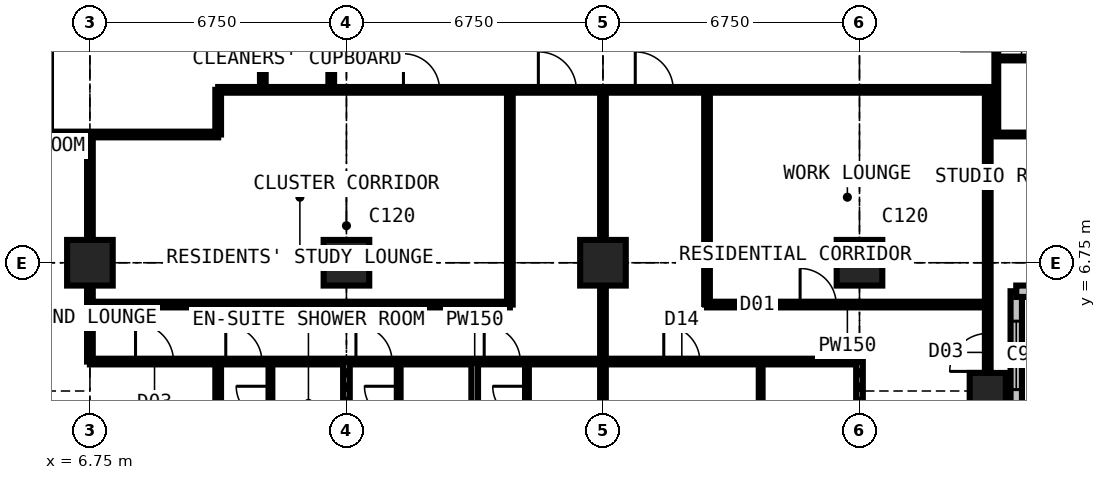
"""IFC4 building model, lengths in metres.
Left out: names, types, materials, properties, quantities, classifications, styles, units other than length and angle.
Written with IfcOpenShell. Run it as: python <this file> out.ifc"""

import sys

from ifc_helpers import new_model, si_unit, direction, frame, frame_2d, origin, origin_2d, place, context, subcontext, project, spatial, rectangle, extrude, element, fill, save


model = new_model("IFC4")
c1 = context("Model", 3, precision=1e-05, world=origin(), true_north=direction((0.0, 1.0)))
c2 = subcontext(c1, "Body", "Model", "MODEL_VIEW")
j1 = project(units=[si_unit("LENGTHUNIT", "METRE"), si_unit("PLANEANGLEUNIT", "RADIAN")], contexts=[c1])
p1 = place(None, origin())
s1 = spatial("IfcSite", under=j1, at=p1, CompositionType="ELEMENT")
p2 = place(p1, origin())
s2 = spatial("IfcBuilding", under=s1, at=p2, CompositionType="ELEMENT")
p3 = place(p2, frame((0.0, 0.0, 174.6)))
s3 = spatial("IfcBuildingStorey", under=s2, at=p3, CompositionType="ELEMENT", Elevation=174.6)
for number, where, z_axis, x_axis in (
    (1, (6.75, 6.75, 0.0), (0.0, 0.0, 1.0), (1.0, 0.0, 0.0)),
    (2, (13.5, 6.75, 0.0), (0.0, 0.0, 1.0), (1.0, 0.0, 0.0)),
    (3, (20.25, 6.75, 0.0), (0.0, 0.0, 1.0), (1.0, 0.0, 0.0)),
    (4, (27.0, 6.75, 0.0), (0.0, 0.0, 1.0), (1.0, 0.0, 0.0)),
):
    element("IfcColumn", number, at=place(p3, frame(where, z_axis=z_axis, x_axis=x_axis)), inside=s3, PredefinedType="COLUMN", context=c2, shape_type="SweptSolid", body=[
        extrude(rectangle(XDim=1.2, YDim=1.2, at=origin_2d()), origin(), (0.0, 0.0, 1.0), 3.6),
    ])
p4 = place(p3, frame((30.375, 3.375, 0.0), z_axis=(0.0, 0.0, 1.0), x_axis=(1.0, 0.0, 0.0)))
e5 = element("IfcColumn", 5, at=p4, inside=s3, PredefinedType="COLUMN", context=c2, shape_type="SweptSolid", body=[
    extrude(rectangle(XDim=0.95, YDim=0.95, at=origin_2d()), origin(), (0.0, 0.0, 1.0), 3.6),
])
p5 = place(p3, frame((31.125, 2.625, 0.0), z_axis=(0.0, 0.0, 1.0), x_axis=(0.0, 1.0, 0.0)))
e6 = element("IfcWall", 6, at=p5, inside=s3, PredefinedType="SOLIDWALL", context=c2, shape_type="SweptSolid", body=[
    extrude(rectangle(XDim=3.375, YDim=0.3, at=frame_2d((1.688, 0.0))), origin(), (0.0, 0.0, 1.0), 3.375),
])
p6 = place(p5, frame((0.788, 0.0, 0.6)))
e7 = element("IfcOpeningElement", 7, at=p6, cuts=e6, PredefinedType="OPENING", context=c2, shape_type="SweptSolid", body=[
    extrude(rectangle(XDim=1.8, YDim=2.1, at=frame_2d((0.9, 1.05))), frame((0.0, 0.16, 0.0), z_axis=(0.0, -1.0, 0.0), x_axis=(1.0, 0.0, 0.0)), (0.0, 0.0, 1.0), 0.32),
])
p7 = place(p3, frame((31.125, 6.0, 0.0), z_axis=(0.0, 0.0, 1.0), x_axis=(1.0, 0.0, 0.0)))
e8 = element("IfcWall", 8, at=p7, inside=s3, PredefinedType="SOLIDWALL", context=c2, shape_type="SweptSolid", body=[
    extrude(rectangle(XDim=3.375, YDim=0.3, at=frame_2d((1.688, 0.0))), origin(), (0.0, 0.0, 1.0), 3.375),
])
p8 = place(p7, frame((0.788, 0.0, 0.6)))
e9 = element("IfcOpeningElement", 9, at=p8, cuts=e8, PredefinedType="OPENING", context=c2, shape_type="SweptSolid", body=[
    extrude(rectangle(XDim=1.8, YDim=2.1, at=frame_2d((0.9, 1.05))), frame((0.0, 0.16, 0.0), z_axis=(0.0, -1.0, 0.0), x_axis=(1.0, 0.0, 0.0)), (0.0, 0.0, 1.0), 0.32),
])
p9 = place(p3, frame((-0.734, 10.125, 0.0), z_axis=(0.0, 0.0, 1.0), x_axis=(1.0, 0.0, 0.0)))
e10 = element("IfcWall", 10, at=p9, inside=s3, PredefinedType="PARTITIONING", context=c2, shape_type="SweptSolid", body=[
    extrude(rectangle(XDim=10.859, YDim=0.15, at=frame_2d((5.429, 0.0))), origin(), (0.0, 0.0, 1.0), 3.375),
])
p10 = place(p3, frame((6.75, 4.15, 0.0), z_axis=(0.0, 0.0, 1.0), x_axis=(0.0, 1.0, 0.0)))
e11 = element("IfcWall", 11, at=p10, inside=s3, PredefinedType="PARTITIONING", context=c2, shape_type="SweptSolid", body=[
    extrude(rectangle(XDim=5.975, YDim=0.15, at=frame_2d((2.988, 0.0))), origin(), (0.0, 0.0, 1.0), 2.877),
])
p11 = place(p3, frame((6.75, 4.15, 0.0), z_axis=(0.0, 0.0, 1.0), x_axis=(1.0, 0.0, 0.0)))
e12 = element("IfcWall", 12, at=p11, inside=s3, PredefinedType="PARTITIONING", context=c2, shape_type="SweptSolid", body=[
    extrude(rectangle(XDim=20.25, YDim=0.15, at=frame_2d((10.125, 0.0))), origin(), (0.0, 0.0, 1.0), 3.375),
])
p12 = place(p11, frame((1.2, 0.0, 0.0)))
e13 = element("IfcOpeningElement", 13, at=p12, cuts=e12, PredefinedType="OPENING", context=c2, shape_type="SweptSolid", body=[
    extrude(rectangle(XDim=1.0, YDim=2.2, at=frame_2d((0.5, 1.1))), frame((0.0, 0.085, 0.0), z_axis=(0.0, -1.0, 0.0), x_axis=(1.0, 0.0, 0.0)), (0.0, 0.0, 1.0), 0.17),
])
p13 = place(p11, frame((3.575, 0.0, 0.0)))
e14 = element("IfcOpeningElement", 14, at=p13, cuts=e12, PredefinedType="OPENING", context=c2, shape_type="SweptSolid", body=[
    extrude(rectangle(XDim=0.95, YDim=2.2, at=frame_2d((0.475, 1.1))), frame((0.0, 0.085, 0.0), z_axis=(0.0, -1.0, 0.0), x_axis=(1.0, 0.0, 0.0)), (0.0, 0.0, 1.0), 0.17),
])
p14 = place(p11, frame((7.0, 0.0, 0.0)))
e15 = element("IfcOpeningElement", 15, at=p14, cuts=e12, PredefinedType="OPENING", context=c2, shape_type="SweptSolid", body=[
    extrude(rectangle(XDim=0.95, YDim=2.2, at=frame_2d((0.475, 1.1))), frame((0.0, 0.085, 0.0), z_axis=(0.0, -1.0, 0.0), x_axis=(1.0, 0.0, 0.0)), (0.0, 0.0, 1.0), 0.17),
])
p15 = place(p11, frame((10.375, 0.0, 0.0)))
e16 = element("IfcOpeningElement", 16, at=p15, cuts=e12, PredefinedType="OPENING", context=c2, shape_type="SweptSolid", body=[
    extrude(rectangle(XDim=0.95, YDim=2.2, at=frame_2d((0.475, 1.1))), frame((0.0, 0.085, 0.0), z_axis=(0.0, -1.0, 0.0), x_axis=(1.0, 0.0, 0.0)), (0.0, 0.0, 1.0), 0.17),
])
p16 = place(p11, frame((15.1, 0.0, 0.0)))
e17 = element("IfcOpeningElement", 17, at=p16, cuts=e12, PredefinedType="OPENING", context=c2, shape_type="SweptSolid", body=[
    extrude(rectangle(XDim=0.95, YDim=2.2, at=frame_2d((0.475, 1.1))), frame((0.0, 0.085, 0.0), z_axis=(0.0, -1.0, 0.0), x_axis=(1.0, 0.0, 0.0)), (0.0, 0.0, 1.0), 0.17),
])
p17 = place(p3, frame((6.75, 5.65, 0.0), z_axis=(0.0, 0.0, 1.0), x_axis=(1.0, 0.0, 0.0)))
e18 = element("IfcWall", 18, at=p17, inside=s3, PredefinedType="PARTITIONING", context=c2, shape_type="SweptSolid", body=[
    extrude(rectangle(XDim=11.05, YDim=0.15, at=frame_2d((5.525, 0.0))), origin(), (0.0, 0.0, 1.0), 3.375),
])
p18 = place(p3, frame((10.125, -0.734, 0.0), z_axis=(0.0, 0.0, 1.0), x_axis=(0.0, 1.0, 0.0)))
e19 = element("IfcWall", 19, at=p18, inside=s3, PredefinedType="PARTITIONING", context=c2, shape_type="SweptSolid", body=[
    extrude(rectangle(XDim=4.884, YDim=0.15, at=frame_2d((2.442, 0.0))), origin(), (0.0, 0.0, 1.0), 3.375),
])
p19 = place(p3, frame((10.125, 10.125, 0.0), z_axis=(0.0, 0.0, 1.0), x_axis=(0.0, 1.0, 0.0)))
e20 = element("IfcWall", 20, at=p19, inside=s3, PredefinedType="PARTITIONING", context=c2, shape_type="SweptSolid", body=[
    extrude(rectangle(XDim=1.175, YDim=0.15, at=frame_2d((0.587, 0.0))), origin(), (0.0, 0.0, 1.0), 3.375),
])
p20 = place(p3, frame((10.125, 11.3, 0.0), z_axis=(0.0, 0.0, 1.0), x_axis=(1.0, 0.0, 0.0)))
e21 = element("IfcWall", 21, at=p20, inside=s3, PredefinedType="PARTITIONING", context=c2, shape_type="SweptSolid", body=[
    extrude(rectangle(XDim=20.475, YDim=0.15, at=frame_2d((10.238, 0.0))), origin(), (0.0, 0.0, 1.0), 3.375),
])
p21 = place(p20, frame((8.425, 0.0, 0.0)))
e22 = element("IfcOpeningElement", 22, at=p21, cuts=e21, PredefinedType="OPENING", context=c2, shape_type="SweptSolid", body=[
    extrude(rectangle(XDim=1.0, YDim=2.2, at=frame_2d((0.5, 1.1))), frame((0.0, 0.085, 0.0), z_axis=(0.0, -1.0, 0.0), x_axis=(1.0, 0.0, 0.0)), (0.0, 0.0, 1.0), 0.17),
])
p22 = place(p20, frame((10.975, 0.0, 0.0)))
e23 = element("IfcOpeningElement", 23, at=p22, cuts=e21, PredefinedType="OPENING", context=c2, shape_type="SweptSolid", body=[
    extrude(rectangle(XDim=1.0, YDim=2.2, at=frame_2d((0.5, 1.1))), frame((0.0, 0.085, 0.0), z_axis=(0.0, -1.0, 0.0), x_axis=(1.0, 0.0, 0.0)), (0.0, 0.0, 1.0), 0.17),
])
p23 = place(p20, frame((4.875, 0.0, 0.0)))
e24 = element("IfcOpeningElement", 24, at=p23, cuts=e21, PredefinedType="OPENING", context=c2, shape_type="SweptSolid", body=[
    extrude(rectangle(XDim=0.95, YDim=2.2, at=frame_2d((0.475, 1.1))), frame((0.0, 0.085, 0.0), z_axis=(0.0, -1.0, 0.0), x_axis=(1.0, 0.0, 0.0)), (0.0, 0.0, 1.0), 0.17),
])
p24 = place(p3, frame((11.3, 11.3, 0.0), z_axis=(0.0, 0.0, 1.0), x_axis=(0.0, 1.0, 0.0)))
e25 = element("IfcWall", 25, at=p24, inside=s3, PredefinedType="PARTITIONING", context=c2, shape_type="SweptSolid", body=[
    extrude(rectangle(XDim=19.3, YDim=0.15, at=frame_2d((9.65, 0.0))), origin(), (0.0, 0.0, 1.0), 3.375),
])
p25 = place(p24, frame((18.1, 0.0, 0.0)))
e26 = element("IfcOpeningElement", 26, at=p25, cuts=e25, PredefinedType="OPENING", context=c2, shape_type="SweptSolid", body=[
    extrude(rectangle(XDim=1.0, YDim=2.2, at=frame_2d((0.5, 1.1))), frame((0.0, 0.085, 0.0), z_axis=(0.0, -1.0, 0.0), x_axis=(1.0, 0.0, 0.0)), (0.0, 0.0, 1.0), 0.17),
])
p26 = place(p24, frame((10.137, 0.0, 0.0)))
e27 = element("IfcOpeningElement", 27, at=p26, cuts=e25, PredefinedType="OPENING", context=c2, shape_type="SweptSolid", body=[
    extrude(rectangle(XDim=1.0, YDim=2.2, at=frame_2d((0.5, 1.1))), frame((0.0, 0.085, 0.0), z_axis=(0.0, -1.0, 0.0), x_axis=(1.0, 0.0, 0.0)), (0.0, 0.0, 1.0), 0.17),
])
p27 = place(p3, frame((11.5, 1.95, 0.0), z_axis=(0.0, 0.0, 1.0), x_axis=(0.0, 1.0, 0.0)))
e28 = element("IfcWall", 28, at=p27, inside=s3, PredefinedType="PARTITIONING", context=c2, shape_type="SweptSolid", body=[
    extrude(rectangle(XDim=2.2, YDim=0.1, at=frame_2d((1.1, 0.0))), origin(), (0.0, 0.0, 1.0), 3.375),
])
p28 = place(p27, frame((0.65, 0.0, 0.0)))
e29 = element("IfcOpeningElement", 29, at=p28, cuts=e28, PredefinedType="OPENING", context=c2, shape_type="SweptSolid", body=[
    extrude(rectangle(XDim=0.9, YDim=2.2, at=frame_2d((0.45, 1.1))), frame((0.0, 0.06, 0.0), z_axis=(0.0, -1.0, 0.0), x_axis=(1.0, 0.0, 0.0)), (0.0, 0.0, 1.0), 0.12),
])
p29 = place(p3, frame((13.1, 11.3, 0.0), z_axis=(0.0, 0.0, 1.0), x_axis=(0.0, 1.0, 0.0)))
e30 = element("IfcWall", 30, at=p29, inside=s3, PredefinedType="PARTITIONING", context=c2, shape_type="SweptSolid", body=[
    extrude(rectangle(XDim=1.6, YDim=0.15, at=frame_2d((0.8, 0.0))), origin(), (0.0, 0.0, 1.0), 3.375),
])
p30 = place(p3, frame((13.5, -0.734, 0.0), z_axis=(0.0, 0.0, 1.0), x_axis=(0.0, 1.0, 0.0)))
e31 = element("IfcWall", 31, at=p30, inside=s3, PredefinedType="PARTITIONING", context=c2, shape_type="SweptSolid", body=[
    extrude(rectangle(XDim=4.884, YDim=0.175, at=frame_2d((2.442, 0.0))), origin(), (0.0, 0.0, 1.0), 2.61),
])
p31 = place(p3, frame((14.875, 1.95, 0.0), z_axis=(0.0, 0.0, 1.0), x_axis=(0.0, 1.0, 0.0)))
e32 = element("IfcWall", 32, at=p31, inside=s3, PredefinedType="PARTITIONING", context=c2, shape_type="SweptSolid", body=[
    extrude(rectangle(XDim=2.2, YDim=0.1, at=frame_2d((1.1, 0.0))), origin(), (0.0, 0.0, 1.0), 3.375),
])
p32 = place(p31, frame((0.65, 0.0, 0.0)))
e33 = element("IfcOpeningElement", 33, at=p32, cuts=e32, PredefinedType="OPENING", context=c2, shape_type="SweptSolid", body=[
    extrude(rectangle(XDim=0.9, YDim=2.2, at=frame_2d((0.45, 1.1))), frame((0.0, 0.06, 0.0), z_axis=(0.0, -1.0, 0.0), x_axis=(1.0, 0.0, 0.0)), (0.0, 0.0, 1.0), 0.12),
])
p33 = place(p3, frame((16.875, -0.734, 0.0), z_axis=(0.0, 0.0, 1.0), x_axis=(0.0, 1.0, 0.0)))
e34 = element("IfcWall", 34, at=p33, inside=s3, PredefinedType="PARTITIONING", context=c2, shape_type="SweptSolid", body=[
    extrude(rectangle(XDim=4.884, YDim=0.175, at=frame_2d((2.442, 0.0))), origin(), (0.0, 0.0, 1.0), 3.375),
])
p34 = place(p3, frame((17.8, 5.65, 0.0), z_axis=(0.0, 0.0, 1.0), x_axis=(0.0, 1.0, 0.0)))
e35 = element("IfcWall", 35, at=p34, inside=s3, PredefinedType="PARTITIONING", context=c2, shape_type="SweptSolid", body=[
    extrude(rectangle(XDim=5.65, YDim=0.15, at=frame_2d((2.825, 0.0))), origin(), (0.0, 0.0, 1.0), 3.375),
])
p35 = place(p3, frame((18.25, 1.95, 0.0), z_axis=(0.0, 0.0, 1.0), x_axis=(0.0, 1.0, 0.0)))
e36 = element("IfcWall", 36, at=p35, inside=s3, PredefinedType="PARTITIONING", context=c2, shape_type="SweptSolid", body=[
    extrude(rectangle(XDim=2.2, YDim=0.1, at=frame_2d((1.1, 0.0))), origin(), (0.0, 0.0, 1.0), 3.375),
])
p36 = place(p35, frame((0.65, 0.0, 0.0)))
e37 = element("IfcOpeningElement", 37, at=p36, cuts=e36, PredefinedType="OPENING", context=c2, shape_type="SweptSolid", body=[
    extrude(rectangle(XDim=0.9, YDim=2.2, at=frame_2d((0.45, 1.1))), frame((0.0, 0.06, 0.0), z_axis=(0.0, -1.0, 0.0), x_axis=(1.0, 0.0, 0.0)), (0.0, 0.0, 1.0), 0.12),
])
p37 = place(p3, frame((20.25, -0.734, 0.0), z_axis=(0.0, 0.0, 1.0), x_axis=(0.0, 1.0, 0.0)))
e38 = element("IfcWall", 38, at=p37, inside=s3, PredefinedType="PARTITIONING", context=c2, shape_type="SweptSolid", body=[
    extrude(rectangle(XDim=12.034, YDim=0.15, at=frame_2d((6.017, 0.0))), origin(), (0.0, 0.0, 1.0), 2.61),
])
p38 = place(p3, frame((22.988, 5.65, 0.0), z_axis=(0.0, 0.0, 1.0), x_axis=(1.0, 0.0, 0.0)))
e39 = element("IfcWall", 39, at=p38, inside=s3, PredefinedType="PARTITIONING", context=c2, shape_type="SweptSolid", body=[
    extrude(rectangle(XDim=7.387, YDim=0.15, at=frame_2d((3.694, 0.0))), origin(), (0.0, 0.0, 1.0), 3.375),
])
p39 = place(p38, frame((2.45, 0.0, 0.0)))
e40 = element("IfcOpeningElement", 40, at=p39, cuts=e39, PredefinedType="OPENING", context=c2, shape_type="SweptSolid", body=[
    extrude(rectangle(XDim=0.95, YDim=2.2, at=frame_2d((0.475, 1.1))), frame((0.0, 0.085, 0.0), z_axis=(0.0, -1.0, 0.0), x_axis=(1.0, 0.0, 0.0)), (0.0, 0.0, 1.0), 0.17),
])
p40 = place(p3, frame((22.988, 5.65, 0.0), z_axis=(0.0, 0.0, 1.0), x_axis=(0.0, 1.0, 0.0)))
e41 = element("IfcWall", 41, at=p40, inside=s3, PredefinedType="PARTITIONING", context=c2, shape_type="SweptSolid", body=[
    extrude(rectangle(XDim=5.65, YDim=0.15, at=frame_2d((2.825, 0.0))), origin(), (0.0, 0.0, 1.0), 3.375),
])
p41 = place(p3, frame((24.4, 1.75, 0.0), z_axis=(0.0, 0.0, 1.0), x_axis=(0.0, 1.0, 0.0)))
e42 = element("IfcWall", 42, at=p41, inside=s3, PredefinedType="PARTITIONING", context=c2, shape_type="SweptSolid", body=[
    extrude(rectangle(XDim=2.4, YDim=0.1, at=frame_2d((1.2, 0.0))), origin(), (0.0, 0.0, 1.0), 3.375),
])
p42 = place(p3, frame((27.0, -0.734, 0.0), z_axis=(0.0, 0.0, 1.0), x_axis=(0.0, 1.0, 0.0)))
e43 = element("IfcWall", 43, at=p42, inside=s3, PredefinedType="PARTITIONING", context=c2, shape_type="SweptSolid", body=[
    extrude(rectangle(XDim=4.884, YDim=0.175, at=frame_2d((2.442, 0.0))), origin(), (0.0, 0.0, 1.0), 2.877),
])
p43 = place(p3, frame((30.375, 2.775, 0.0), z_axis=(0.0, 0.0, 1.0), x_axis=(0.0, 1.0, 0.0)))
e44 = element("IfcWall", 44, at=p43, inside=s3, PredefinedType="PARTITIONING", context=c2, shape_type="SweptSolid", body=[
    extrude(rectangle(XDim=8.525, YDim=0.15, at=frame_2d((4.263, 0.0))), origin(), (0.0, 0.0, 1.0), 2.877),
])
p44 = place(p43, frame((1.116, 0.0, 0.0)))
e45 = element("IfcOpeningElement", 45, at=p44, cuts=e44, PredefinedType="OPENING", context=c2, shape_type="SweptSolid", body=[
    extrude(rectangle(XDim=1.0, YDim=2.2, at=frame_2d((0.5, 1.1))), frame((0.0, 0.085, 0.0), z_axis=(0.0, -1.0, 0.0), x_axis=(1.0, 0.0, 0.0)), (0.0, 0.0, 1.0), 0.17),
])
p45 = place(p3, frame((30.6, 10.125, 0.0), z_axis=(0.0, 0.0, 1.0), x_axis=(0.0, 1.0, 0.0)))
e46 = element("IfcWall", 46, at=p45, inside=s3, PredefinedType="PARTITIONING", context=c2, shape_type="SweptSolid", body=[
    extrude(rectangle(XDim=3.375, YDim=0.1, at=frame_2d((1.688, 0.0))), origin(), (0.0, 0.0, 1.0), 3.375),
])
p46 = place(p45, frame((2.2, 0.0, 0.0)))
e47 = element("IfcOpeningElement", 47, at=p46, cuts=e46, PredefinedType="OPENING", context=c2, shape_type="SweptSolid", body=[
    extrude(rectangle(XDim=0.95, YDim=2.2, at=frame_2d((0.475, 1.1))), frame((0.0, 0.06, 0.0), z_axis=(0.0, -1.0, 0.0), x_axis=(1.0, 0.0, 0.0)), (0.0, 0.0, 1.0), 0.12),
])
p47 = place(p3, frame((30.6, 10.125, 0.0), z_axis=(0.0, 0.0, 1.0), x_axis=(1.0, 0.0, 0.0)))
e48 = element("IfcWall", 48, at=p47, inside=s3, PredefinedType="PARTITIONING", context=c2, shape_type="SweptSolid", body=[
    extrude(rectangle(XDim=3.884, YDim=0.1, at=frame_2d((1.942, 0.0))), origin(), (0.0, 0.0, 1.0), 3.375),
])
p48 = place(p3, frame((30.6, 12.125, 0.0), z_axis=(0.0, 0.0, 1.0), x_axis=(1.0, 0.0, 0.0)))
e49 = element("IfcWall", 49, at=p48, inside=s3, PredefinedType="PARTITIONING", context=c2, shape_type="SweptSolid", body=[
    extrude(rectangle(XDim=2.2, YDim=0.1, at=frame_2d((1.1, 0.0))), origin(), (0.0, 0.0, 1.0), 3.375),
])
p49 = place(p48, frame((0.65, 0.0, 0.0)))
e50 = element("IfcOpeningElement", 50, at=p49, cuts=e49, PredefinedType="OPENING", context=c2, shape_type="SweptSolid", body=[
    extrude(rectangle(XDim=0.9, YDim=2.2, at=frame_2d((0.45, 1.1))), frame((0.0, 0.06, 0.0), z_axis=(0.0, -1.0, 0.0), x_axis=(1.0, 0.0, 0.0)), (0.0, 0.0, 1.0), 0.12),
])
p50 = place(p6, origin())
e51 = element("IfcWindow", 51, at=p50, inside=s3, PartitioningType="SINGLE_PANEL", PredefinedType="WINDOW", context=c2, shape_type="SweptSolid", body=[
    extrude(rectangle(XDim=1.8, YDim=2.1, at=frame_2d((0.9, 1.05))), frame((0.0, 0.03, 0.0), z_axis=(0.0, -1.0, 0.0), x_axis=(1.0, 0.0, 0.0)), (0.0, 0.0, 1.0), 0.06),
])
fill(e7, e51)
p51 = place(p12, origin())
e52 = element("IfcDoor", 52, at=p51, inside=s3, OperationType="SINGLE_SWING_LEFT", PredefinedType="DOOR", context=c2, shape_type="SweptSolid", body=[
    extrude(rectangle(XDim=1.0, YDim=2.2, at=frame_2d((0.5, 1.1))), frame((0.0, 0.025, 0.0), z_axis=(0.0, -1.0, 0.0), x_axis=(1.0, 0.0, 0.0)), (0.0, 0.0, 1.0), 0.05),
])
fill(e13, e52)
p52 = place(p13, origin())
e53 = element("IfcDoor", 53, at=p52, inside=s3, OperationType="SINGLE_SWING_LEFT", PredefinedType="DOOR", context=c2, shape_type="SweptSolid", body=[
    extrude(rectangle(XDim=0.95, YDim=2.2, at=frame_2d((0.475, 1.1))), frame((0.0, 0.025, 0.0), z_axis=(0.0, -1.0, 0.0), x_axis=(1.0, 0.0, 0.0)), (0.0, 0.0, 1.0), 0.05),
])
fill(e14, e53)
p53 = place(p28, origin())
e54 = element("IfcDoor", 54, at=p53, inside=s3, OperationType="SINGLE_SWING_RIGHT", PredefinedType="DOOR", context=c2, shape_type="SweptSolid", body=[
    extrude(rectangle(XDim=0.9, YDim=2.2, at=frame_2d((0.45, 1.1))), frame((0.0, 0.025, 0.0), z_axis=(0.0, -1.0, 0.0), x_axis=(1.0, 0.0, 0.0)), (0.0, 0.0, 1.0), 0.05),
])
fill(e29, e54)
p54 = place(p14, origin())
e55 = element("IfcDoor", 55, at=p54, inside=s3, OperationType="SINGLE_SWING_LEFT", PredefinedType="DOOR", context=c2, shape_type="SweptSolid", body=[
    extrude(rectangle(XDim=0.95, YDim=2.2, at=frame_2d((0.475, 1.1))), frame((0.0, 0.025, 0.0), z_axis=(0.0, -1.0, 0.0), x_axis=(1.0, 0.0, 0.0)), (0.0, 0.0, 1.0), 0.05),
])
fill(e15, e55)
p55 = place(p32, origin())
e56 = element("IfcDoor", 56, at=p55, inside=s3, OperationType="SINGLE_SWING_RIGHT", PredefinedType="DOOR", context=c2, shape_type="SweptSolid", body=[
    extrude(rectangle(XDim=0.9, YDim=2.2, at=frame_2d((0.45, 1.1))), frame((0.0, 0.025, 0.0), z_axis=(0.0, -1.0, 0.0), x_axis=(1.0, 0.0, 0.0)), (0.0, 0.0, 1.0), 0.05),
])
fill(e33, e56)
p56 = place(p15, origin())
e57 = element("IfcDoor", 57, at=p56, inside=s3, OperationType="SINGLE_SWING_LEFT", PredefinedType="DOOR", context=c2, shape_type="SweptSolid", body=[
    extrude(rectangle(XDim=0.95, YDim=2.2, at=frame_2d((0.475, 1.1))), frame((0.0, 0.025, 0.0), z_axis=(0.0, -1.0, 0.0), x_axis=(1.0, 0.0, 0.0)), (0.0, 0.0, 1.0), 0.05),
])
fill(e16, e57)
p57 = place(p36, origin())
e58 = element("IfcDoor", 58, at=p57, inside=s3, OperationType="SINGLE_SWING_RIGHT", PredefinedType="DOOR", context=c2, shape_type="SweptSolid", body=[
    extrude(rectangle(XDim=0.9, YDim=2.2, at=frame_2d((0.45, 1.1))), frame((0.0, 0.025, 0.0), z_axis=(0.0, -1.0, 0.0), x_axis=(1.0, 0.0, 0.0)), (0.0, 0.0, 1.0), 0.05),
])
fill(e37, e58)
p58 = place(p21, origin())
e59 = element("IfcDoor", 59, at=p58, inside=s3, OperationType="SINGLE_SWING_LEFT", PredefinedType="DOOR", context=c2, shape_type="SweptSolid", body=[
    extrude(rectangle(XDim=1.0, YDim=2.2, at=frame_2d((0.5, 1.1))), frame((0.0, 0.025, 0.0), z_axis=(0.0, -1.0, 0.0), x_axis=(1.0, 0.0, 0.0)), (0.0, 0.0, 1.0), 0.05),
])
fill(e22, e59)
p59 = place(p16, origin())
e60 = element("IfcDoor", 60, at=p59, inside=s3, OperationType="SINGLE_SWING_LEFT", PredefinedType="DOOR", context=c2, shape_type="SweptSolid", body=[
    extrude(rectangle(XDim=0.95, YDim=2.2, at=frame_2d((0.475, 1.1))), frame((0.0, 0.025, 0.0), z_axis=(0.0, -1.0, 0.0), x_axis=(1.0, 0.0, 0.0)), (0.0, 0.0, 1.0), 0.05),
])
fill(e17, e60)
p60 = place(p22, origin())
e61 = element("IfcDoor", 61, at=p60, inside=s3, OperationType="SINGLE_SWING_LEFT", PredefinedType="DOOR", context=c2, shape_type="SweptSolid", body=[
    extrude(rectangle(XDim=1.0, YDim=2.2, at=frame_2d((0.5, 1.1))), frame((0.0, 0.025, 0.0), z_axis=(0.0, -1.0, 0.0), x_axis=(1.0, 0.0, 0.0)), (0.0, 0.0, 1.0), 0.05),
])
fill(e23, e61)
p61 = place(p23, origin())
e62 = element("IfcDoor", 62, at=p61, inside=s3, OperationType="SINGLE_SWING_LEFT", PredefinedType="DOOR", context=c2, shape_type="SweptSolid", body=[
    extrude(rectangle(XDim=0.95, YDim=2.2, at=frame_2d((0.475, 1.1))), frame((0.0, 0.025, 0.0), z_axis=(0.0, -1.0, 0.0), x_axis=(1.0, 0.0, 0.0)), (0.0, 0.0, 1.0), 0.05),
])
fill(e24, e62)
p62 = place(p39, origin())
e63 = element("IfcDoor", 63, at=p62, inside=s3, OperationType="SINGLE_SWING_LEFT", PredefinedType="DOOR", context=c2, shape_type="SweptSolid", body=[
    extrude(rectangle(XDim=0.95, YDim=2.2, at=frame_2d((0.475, 1.1))), frame((0.0, 0.025, 0.0), z_axis=(0.0, -1.0, 0.0), x_axis=(1.0, 0.0, 0.0)), (0.0, 0.0, 1.0), 0.05),
])
fill(e40, e63)
p63 = place(p44, origin())
e64 = element("IfcDoor", 64, at=p63, inside=s3, OperationType="SINGLE_SWING_LEFT", PredefinedType="DOOR", context=c2, shape_type="SweptSolid", body=[
    extrude(rectangle(XDim=1.0, YDim=2.2, at=frame_2d((0.5, 1.1))), frame((0.0, 0.025, 0.0), z_axis=(0.0, -1.0, 0.0), x_axis=(1.0, 0.0, 0.0)), (0.0, 0.0, 1.0), 0.05),
])
fill(e45, e64)
p64 = place(p49, origin())
e65 = element("IfcDoor", 65, at=p64, inside=s3, OperationType="SINGLE_SWING_RIGHT", PredefinedType="DOOR", context=c2, shape_type="SweptSolid", body=[
    extrude(rectangle(XDim=0.9, YDim=2.2, at=frame_2d((0.45, 1.1))), frame((0.0, 0.025, 0.0), z_axis=(0.0, -1.0, 0.0), x_axis=(1.0, 0.0, 0.0)), (0.0, 0.0, 1.0), 0.05),
])
fill(e50, e65)
save(model, sys.argv[1])
